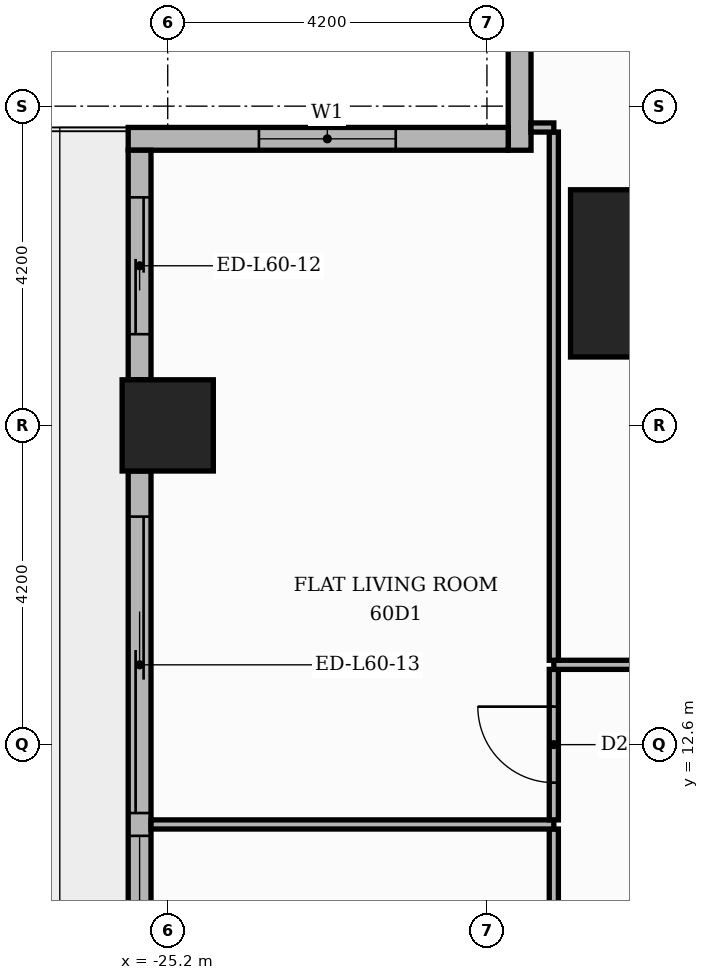
"""IFC4 building model, lengths in metres.
Left out: names, types, materials, properties, quantities, classifications, styles, units other than length and angle.
Written with IfcOpenShell. Run it as: python <this file> out.ifc"""

import sys

from ifc_helpers import new_model, si_unit, direction, frame, frame_2d, origin, origin_2d, place, context, subcontext, project, spatial, rectangle, extrude, element, fill, save


model = new_model("IFC4")
c1 = context("Model", 3, precision=1e-05, world=origin(), true_north=direction((0.0, 1.0)))
c2 = subcontext(c1, "Body", "Model", "MODEL_VIEW")
j1 = project(units=[si_unit("LENGTHUNIT", "METRE"), si_unit("PLANEANGLEUNIT", "RADIAN")], contexts=[c1])
p1 = place(None, origin())
s1 = spatial("IfcSite", under=j1, at=p1, CompositionType="ELEMENT")
p2 = place(p1, origin())
s2 = spatial("IfcBuilding", under=s1, at=p2, CompositionType="ELEMENT")
p3 = place(p2, frame((0.0, 0.0, 252.3)))
s3 = spatial("IfcBuildingStorey", under=s2, at=p3, CompositionType="ELEMENT", Elevation=252.3)
p4 = place(p3, frame((-18.8, 18.8, 0.0), z_axis=(0.0, 0.0, 1.0), x_axis=(1.0, 0.0, 0.0)))
e1 = element("IfcColumn", 1, at=p4, inside=s3, PredefinedType="COLUMN", context=c2, shape_type="SweptSolid", body=[
    extrude(rectangle(XDim=2.2, YDim=2.2, at=origin_2d()), origin(), (0.0, 0.0, 1.0), 3.9),
])
p5 = place(p3, frame((-25.2, 16.8, 0.0), z_axis=(0.0, 0.0, 1.0), x_axis=(1.0, 0.0, 0.0)))
e2 = element("IfcColumn", 2, at=p5, inside=s3, PredefinedType="COLUMN", context=c2, shape_type="SweptSolid", body=[
    extrude(rectangle(XDim=1.2, YDim=1.2, at=origin_2d()), origin(), (0.0, 0.0, 1.0), 3.9),
])
p6 = place(p3, frame((-20.57, 25.42, 0.0), z_axis=(0.0, 0.0, 1.0), x_axis=(0.0, -1.0, 0.0)))
e3 = element("IfcWall", 3, at=p6, inside=s3, PredefinedType="STANDARD", context=c2, shape_type="SweptSolid", body=[
    extrude(rectangle(XDim=5.0, YDim=0.3, at=frame_2d((2.5, 0.0))), origin(), (0.0, 0.0, 1.0), 3.48),
])
p7 = place(p6, frame((1.42, 0.0, 0.9)))
e4 = element("IfcOpeningElement", 4, at=p7, cuts=e3, PredefinedType="OPENING", context=c2, shape_type="SweptSolid", body=[
    extrude(rectangle(XDim=1.8, YDim=2.1, at=frame_2d((0.9, 1.05))), frame((0.0, 0.16, 0.0), z_axis=(0.0, -1.0, 0.0), x_axis=(1.0, 0.0, 0.0)), (0.0, 0.0, 1.0), 0.32),
])
p8 = place(p3, frame((-20.72, 20.57, 0.0), z_axis=(0.0, 0.0, 1.0), x_axis=(-1.0, 0.0, 0.0)))
e5 = element("IfcWall", 5, at=p8, inside=s3, PredefinedType="STANDARD", context=c2, shape_type="SweptSolid", body=[
    extrude(rectangle(XDim=5.0, YDim=0.3, at=frame_2d((2.5, 0.0))), origin(), (0.0, 0.0, 1.0), 3.48),
])
p9 = place(p8, frame((1.48, 0.0, 0.9)))
e6 = element("IfcOpeningElement", 6, at=p9, cuts=e5, PredefinedType="OPENING", context=c2, shape_type="SweptSolid", body=[
    extrude(rectangle(XDim=1.8, YDim=2.1, at=frame_2d((0.9, 1.05))), frame((0.0, 0.16, 0.0), z_axis=(0.0, -1.0, 0.0), x_axis=(1.0, 0.0, 0.0)), (0.0, 0.0, 1.0), 0.32),
])
p10 = place(p3, frame((-25.57, 20.42, 0.0), z_axis=(0.0, 0.0, 1.0), x_axis=(0.0, -1.0, 0.0)))
e7 = element("IfcWall", 7, at=p10, inside=s3, PredefinedType="STANDARD", context=c2, shape_type="SweptSolid", body=[
    extrude(rectangle(XDim=3.02, YDim=0.3, at=frame_2d((1.51, 0.0))), origin(), (0.0, 0.0, 1.0), 3.48),
])
p11 = place(p10, frame((0.62, 0.0, 0.0)))
e8 = element("IfcOpeningElement", 8, at=p11, cuts=e7, PredefinedType="OPENING", context=c2, shape_type="SweptSolid", body=[
    extrude(rectangle(XDim=1.8, YDim=2.4, at=frame_2d((0.9, 1.2))), frame((0.0, 0.16, 0.0), z_axis=(0.0, -1.0, 0.0), x_axis=(1.0, 0.0, 0.0)), (0.0, 0.0, 1.0), 0.32),
])
p12 = place(p3, frame((-25.57, 16.2, 0.0), z_axis=(0.0, 0.0, 1.0), x_axis=(0.0, -1.0, 0.0)))
e9 = element("IfcWall", 9, at=p12, inside=s3, PredefinedType="STANDARD", context=c2, shape_type="SweptSolid", body=[
    extrude(rectangle(XDim=7.2, YDim=0.3, at=frame_2d((3.6, 0.0))), origin(), (0.0, 0.0, 1.0), 3.48),
])
p13 = place(p12, frame((0.6, 0.0, 0.0)))
e10 = element("IfcOpeningElement", 10, at=p13, cuts=e9, PredefinedType="OPENING", context=c2, shape_type="SweptSolid", body=[
    extrude(rectangle(XDim=3.9, YDim=2.4, at=frame_2d((1.95, 1.2))), frame((0.0, 0.16, 0.0), z_axis=(0.0, -1.0, 0.0), x_axis=(1.0, 0.0, 0.0)), (0.0, 0.0, 1.0), 0.32),
])
p14 = place(p12, frame((4.8, 0.0, 0.9)))
e11 = element("IfcOpeningElement", 11, at=p14, cuts=e9, PredefinedType="OPENING", context=c2, shape_type="SweptSolid", body=[
    extrude(rectangle(XDim=1.8, YDim=2.1, at=frame_2d((0.9, 1.05))), frame((0.0, 0.16, 0.0), z_axis=(0.0, -1.0, 0.0), x_axis=(1.0, 0.0, 0.0)), (0.0, 0.0, 1.0), 0.32),
])
p15 = place(p3, frame((-20.12, 7.41, 0.0), z_axis=(0.0, 0.0, 1.0), x_axis=(0.0, 1.0, 0.0)))
e12 = element("IfcWall", 12, at=p15, inside=s3, PredefinedType="PARTITIONING", context=c2, shape_type="SweptSolid", body=[
    extrude(rectangle(XDim=4.08, YDim=0.12, at=frame_2d((2.04, 0.0))), origin(), (0.0, 0.0, 1.0), 3.48),
])
p16 = place(p15, frame((1.59, 0.0, 0.0)))
e13 = element("IfcOpeningElement", 13, at=p16, cuts=e12, PredefinedType="OPENING", context=c2, shape_type="SweptSolid", body=[
    extrude(rectangle(XDim=0.9, YDim=2.1, at=frame_2d((0.45, 1.05))), frame((0.0, 0.07, 0.0), z_axis=(0.0, -1.0, 0.0), x_axis=(1.0, 0.0, 0.0)), (0.0, 0.0, 1.0), 0.14),
])
p17 = place(p3, frame((-25.42, 11.55, 0.0), z_axis=(0.0, 0.0, 1.0), x_axis=(1.0, 0.0, 0.0)))
e14 = element("IfcWall", 14, at=p17, inside=s3, PredefinedType="PARTITIONING", context=c2, shape_type="SweptSolid", body=[
    extrude(rectangle(XDim=5.3, YDim=0.12, at=frame_2d((2.65, 0.0))), origin(), (0.0, 0.0, 1.0), 3.48),
])
p18 = place(p3, frame((-20.12, 11.61, 0.0), z_axis=(0.0, 0.0, 1.0), x_axis=(0.0, 1.0, 0.0)))
e15 = element("IfcWall", 15, at=p18, inside=s3, PredefinedType="PARTITIONING", context=c2, shape_type="SweptSolid", body=[
    extrude(rectangle(XDim=1.98, YDim=0.12, at=frame_2d((0.99, 0.0))), origin(), (0.0, 0.0, 1.0), 3.48),
])
p19 = place(p18, frame((0.49, 0.0, 0.0)))
e16 = element("IfcOpeningElement", 16, at=p19, cuts=e15, PredefinedType="OPENING", context=c2, shape_type="SweptSolid", body=[
    extrude(rectangle(XDim=1.0, YDim=2.1, at=frame_2d((0.5, 1.05))), frame((0.0, 0.07, 0.0), z_axis=(0.0, -1.0, 0.0), x_axis=(1.0, 0.0, 0.0)), (0.0, 0.0, 1.0), 0.14),
])
p20 = place(p3, frame((-20.12, 13.65, 0.0), z_axis=(0.0, 0.0, 1.0), x_axis=(1.0, 0.0, 0.0)))
e17 = element("IfcWall", 17, at=p20, inside=s3, PredefinedType="PARTITIONING", context=c2, shape_type="SweptSolid", body=[
    extrude(rectangle(XDim=6.47, YDim=0.12, at=frame_2d((3.235, 0.0))), origin(), (0.0, 0.0, 1.0), 3.48),
])
p21 = place(p20, frame((2.785, 0.0, 0.0)))
e18 = element("IfcOpeningElement", 18, at=p21, cuts=e17, PredefinedType="OPENING", context=c2, shape_type="SweptSolid", body=[
    extrude(rectangle(XDim=0.9, YDim=2.1, at=frame_2d((0.45, 1.05))), frame((0.0, 0.07, 0.0), z_axis=(0.0, -1.0, 0.0), x_axis=(1.0, 0.0, 0.0)), (0.0, 0.0, 1.0), 0.14),
])
p22 = place(p3, frame((-20.12, 13.71, 0.0), z_axis=(0.0, 0.0, 1.0), x_axis=(0.0, 1.0, 0.0)))
e19 = element("IfcWall", 19, at=p22, inside=s3, PredefinedType="PARTITIONING", context=c2, shape_type="SweptSolid", body=[
    extrude(rectangle(XDim=6.949, YDim=0.12, at=frame_2d((3.475, 0.0))), origin(), (0.0, 0.0, 1.0), 3.48),
])
p23 = place(p3, frame((-20.421, 20.719, 0.0), z_axis=(0.0, 0.0, 1.0), x_axis=(1.0, 0.0, 0.0)))
e20 = element("IfcWall", 20, at=p23, inside=s3, PredefinedType="PARTITIONING", context=c2, shape_type="SweptSolid", body=[
    extrude(rectangle(XDim=0.301, YDim=0.12, at=frame_2d((0.15, 0.0))), origin(), (0.0, 0.0, 1.0), 3.48),
])
p24 = place(p9, origin())
e21 = element("IfcWindow", 21, at=p24, inside=s3, PartitioningType="SINGLE_PANEL", PredefinedType="WINDOW", context=c2, shape_type="SweptSolid", body=[
    extrude(rectangle(XDim=1.8, YDim=2.1, at=frame_2d((0.9, 1.05))), frame((0.0, 0.03, 0.0), z_axis=(0.0, -1.0, 0.0), x_axis=(1.0, 0.0, 0.0)), (0.0, 0.0, 1.0), 0.06),
])
fill(e6, e21)
p25 = place(p11, origin())
e22 = element("IfcDoor", 22, at=p25, inside=s3, OperationType="SLIDING_TO_RIGHT", PredefinedType="DOOR", context=c2, shape_type="SweptSolid", body=[
    extrude(rectangle(XDim=1.8, YDim=2.4, at=frame_2d((0.9, 1.2))), frame((0.0, 0.025, 0.0), z_axis=(0.0, -1.0, 0.0), x_axis=(1.0, 0.0, 0.0)), (0.0, 0.0, 1.0), 0.05),
])
fill(e8, e22)
p26 = place(p13, origin())
e23 = element("IfcDoor", 23, at=p26, inside=s3, OperationType="SLIDING_TO_LEFT", PredefinedType="DOOR", context=c2, shape_type="SweptSolid", body=[
    extrude(rectangle(XDim=3.9, YDim=2.4, at=frame_2d((1.95, 1.2))), frame((0.0, 0.025, 0.0), z_axis=(0.0, -1.0, 0.0), x_axis=(1.0, 0.0, 0.0)), (0.0, 0.0, 1.0), 0.05),
])
fill(e10, e23)
p27 = place(p14, origin())
e24 = element("IfcWindow", 24, at=p27, inside=s3, PartitioningType="SINGLE_PANEL", PredefinedType="WINDOW", context=c2, shape_type="SweptSolid", body=[
    extrude(rectangle(XDim=1.8, YDim=2.1, at=frame_2d((0.9, 1.05))), frame((0.0, 0.03, 0.0), z_axis=(0.0, -1.0, 0.0), x_axis=(1.0, 0.0, 0.0)), (0.0, 0.0, 1.0), 0.06),
])
fill(e11, e24)
p28 = place(p19, origin())
e25 = element("IfcDoor", 25, at=p28, inside=s3, OperationType="SINGLE_SWING_RIGHT", PredefinedType="DOOR", context=c2, shape_type="SweptSolid", body=[
    extrude(rectangle(XDim=1.0, YDim=2.1, at=frame_2d((0.5, 1.05))), frame((0.0, 0.025, 0.0), z_axis=(0.0, -1.0, 0.0), x_axis=(1.0, 0.0, 0.0)), (0.0, 0.0, 1.0), 0.05),
])
fill(e16, e25)
save(model, sys.argv[1])
